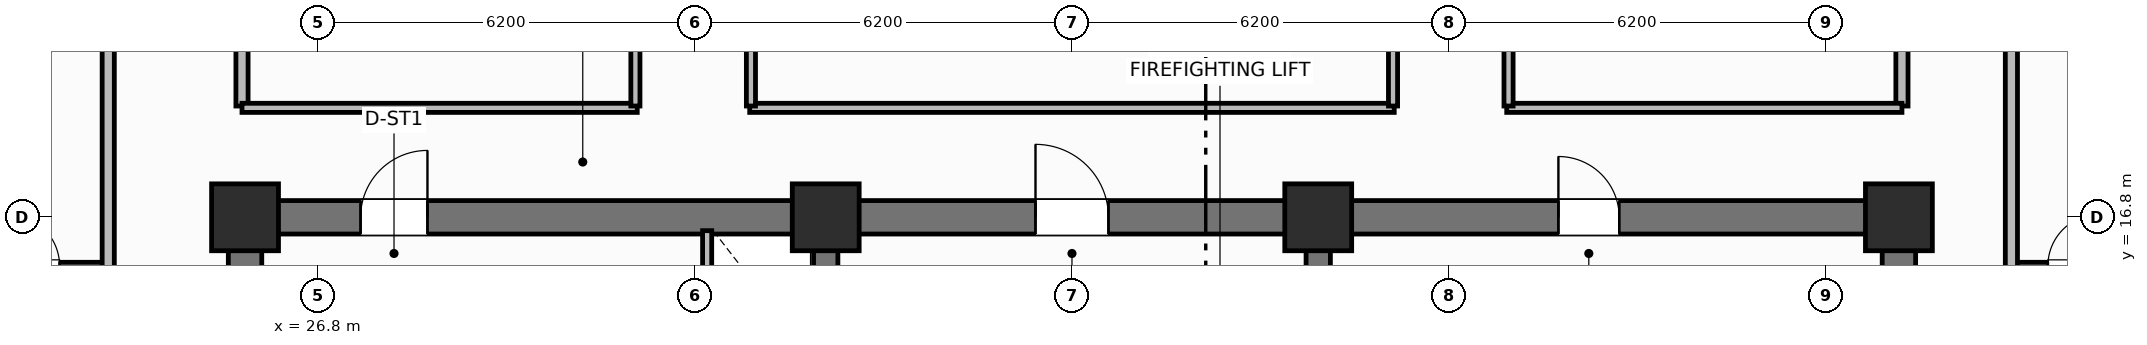
"""IFC4 building model, lengths in metres.
Left out: names, types, materials, properties, quantities, classifications, styles, units other than length and angle.
Written with IfcOpenShell. Run it as: python <this file> out.ifc"""

import sys

from ifc_helpers import new_model, si_unit, direction, frame, frame_2d, origin, origin_2d, place, context, subcontext, project, spatial, rectangle, extrude, element, fill, save


model = new_model("IFC4")
c1 = context("Model", 3, precision=1e-05, world=origin(), true_north=direction((0.0, 1.0)))
c2 = subcontext(c1, "Body", "Model", "MODEL_VIEW")
j1 = project(units=[si_unit("LENGTHUNIT", "METRE"), si_unit("PLANEANGLEUNIT", "RADIAN")], contexts=[c1])
p1 = place(None, origin())
s1 = spatial("IfcSite", under=j1, at=p1, CompositionType="ELEMENT")
p2 = place(p1, origin())
s2 = spatial("IfcBuilding", under=s1, at=p2, CompositionType="ELEMENT")
p3 = place(p2, frame((0.0, 0.0, 125.3)))
s3 = spatial("IfcBuildingStorey", under=s2, at=p3, CompositionType="ELEMENT", Elevation=125.3)
for number, where, z_axis, x_axis in (
    (1, (25.6, 10.875, 0.0), (0.0, 0.0, 1.0), (0.0, 1.0, 0.0)),
    (2, (52.8, 10.875, 0.0), (0.0, 0.0, 1.0), (0.0, 1.0, 0.0)),
):
    element("IfcWall", number, at=place(p3, frame(where, z_axis=z_axis, x_axis=x_axis)), inside=s3, PredefinedType="SHEAR", context=c2, shape_type="SweptSolid", body=[
        extrude(rectangle(XDim=5.65, YDim=0.55, at=frame_2d((2.825, 0.0))), origin(), (0.0, 0.0, 1.0), 3.7),
    ])
p4 = place(p3, frame((25.6, 16.8, 0.0), z_axis=(0.0, 0.0, 1.0), x_axis=(1.0, 0.0, 0.0)))
e3 = element("IfcWall", 3, at=p4, inside=s3, PredefinedType="SHEAR", context=c2, shape_type="SweptSolid", body=[
    extrude(rectangle(XDim=27.2, YDim=0.55, at=frame_2d((13.6, 0.0))), origin(), (0.0, 0.0, 1.0), 3.7),
])
p5 = place(p4, frame((1.9, 0.0, 0.0)))
e4 = element("IfcOpeningElement", 4, at=p5, cuts=e3, PredefinedType="OPENING", context=c2, shape_type="SweptSolid", body=[
    extrude(rectangle(XDim=1.1, YDim=2.15, at=frame_2d((0.55, 1.075))), frame((0.0, 0.285, 0.0), z_axis=(0.0, -1.0, 0.0), x_axis=(1.0, 0.0, 0.0)), (0.0, 0.0, 1.0), 0.57),
])
p6 = place(p4, frame((13.0, 0.0, 0.0)))
e5 = element("IfcOpeningElement", 5, at=p6, cuts=e3, PredefinedType="OPENING", context=c2, shape_type="SweptSolid", body=[
    extrude(rectangle(XDim=1.2, YDim=2.15, at=frame_2d((0.6, 1.075))), frame((0.0, 0.285, 0.0), z_axis=(0.0, -1.0, 0.0), x_axis=(1.0, 0.0, 0.0)), (0.0, 0.0, 1.0), 0.57),
])
p7 = place(p4, frame((21.6, 0.0, 0.0)))
e6 = element("IfcOpeningElement", 6, at=p7, cuts=e3, PredefinedType="OPENING", context=c2, shape_type="SweptSolid", body=[
    extrude(rectangle(XDim=1.0, YDim=2.15, at=frame_2d((0.5, 1.075))), frame((0.0, 0.285, 0.0), z_axis=(0.0, -1.0, 0.0), x_axis=(1.0, 0.0, 0.0)), (0.0, 0.0, 1.0), 0.57),
])
for number, where, z_axis, x_axis in (
    (7, (35.15, 10.875, 0.0), (0.0, 0.0, 1.0), (0.0, 1.0, 0.0)),
    (8, (43.25, 10.875, 0.0), (0.0, 0.0, 1.0), (0.0, 1.0, 0.0)),
):
    element("IfcWall", number, at=place(p3, frame(where, z_axis=z_axis, x_axis=x_axis)), inside=s3, PredefinedType="SHEAR", context=c2, shape_type="SweptSolid", body=[
        extrude(rectangle(XDim=5.65, YDim=0.4, at=frame_2d((2.825, 0.0))), origin(), (0.0, 0.0, 1.0), 3.7),
    ])
for number, where, z_axis, x_axis in (
    (9, (25.6, 16.8, 0.0), (0.0, 0.0, 1.0), (1.0, 0.0, 0.0)),
    (10, (35.15, 16.8, 0.0), (0.0, 0.0, 1.0), (1.0, 0.0, 0.0)),
    (11, (43.25, 16.8, 0.0), (0.0, 0.0, 1.0), (1.0, 0.0, 0.0)),
    (12, (52.8, 16.8, 0.0), (0.0, 0.0, 1.0), (1.0, 0.0, 0.0)),
):
    element("IfcColumn", number, at=place(p3, frame(where, z_axis=z_axis, x_axis=x_axis)), inside=s3, PredefinedType="COLUMN", context=c2, shape_type="SweptSolid", body=[
        extrude(rectangle(XDim=1.1, YDim=1.1, at=origin_2d()), origin(), (0.0, 0.0, 1.0), 3.7),
    ])
p8 = place(p3, frame((33.2, 14.5, 0.0), z_axis=(0.0, 0.0, 1.0), x_axis=(0.0, 1.0, 0.0)))
e13 = element("IfcWall", 13, at=p8, inside=s3, PredefinedType="PARTITIONING", context=c2, shape_type="SweptSolid", body=[
    extrude(rectangle(XDim=2.08, YDim=0.15, at=frame_2d((1.04, 0.0))), origin(), (0.0, 0.0, 1.0), 2.53),
])
p9 = place(p8, frame((0.55, 0.0, 0.0)))
e14 = element("IfcOpeningElement", 14, at=p9, cuts=e13, PredefinedType="OPENING", context=c2, shape_type="SweptSolid", body=[
    extrude(rectangle(XDim=0.85, YDim=2.05, at=frame_2d((0.425, 1.025))), frame((0.0, 0.085, 0.0), z_axis=(0.0, -1.0, 0.0), x_axis=(1.0, 0.0, 0.0)), (0.0, 0.0, 1.0), 0.17),
])
for number, where, z_axis, x_axis in (
    (15, (25.55, 18.63, 0.0), (0.0, 0.0, 1.0), (0.0, 1.0, 0.0)),
    (16, (52.85, 18.63, 0.0), (0.0, 0.0, 1.0), (0.0, 1.0, 0.0)),
):
    element("IfcWall", number, at=place(p3, frame(where, z_axis=z_axis, x_axis=x_axis)), inside=s3, PredefinedType="PARTITIONING", context=c2, shape_type="SweptSolid", body=[
        extrude(rectangle(XDim=19.14, YDim=0.2, at=frame_2d((9.57, 0.0))), origin(), (0.0, 0.0, 1.0), 2.53),
    ])
p10 = place(p3, frame((25.55, 18.6, 0.0), z_axis=(0.0, 0.0, 1.0), x_axis=(1.0, 0.0, 0.0)))
e17 = element("IfcWall", 17, at=p10, inside=s3, PredefinedType="PARTITIONING", context=c2, shape_type="SweptSolid", body=[
    extrude(rectangle(XDim=6.5, YDim=0.15, at=frame_2d((3.25, 0.0))), origin(), (0.0, 0.0, 1.0), 2.53),
])
p11 = place(p3, frame((33.9, 18.6, 0.0), z_axis=(0.0, 0.0, 1.0), x_axis=(1.0, 0.0, 0.0)))
e18 = element("IfcWall", 18, at=p11, inside=s3, PredefinedType="PARTITIONING", context=c2, shape_type="SweptSolid", body=[
    extrude(rectangle(XDim=10.6, YDim=0.15, at=frame_2d((5.3, 0.0))), origin(), (0.0, 0.0, 1.0), 2.53),
])
p12 = place(p3, frame((46.35, 18.6, 0.0), z_axis=(0.0, 0.0, 1.0), x_axis=(1.0, 0.0, 0.0)))
e19 = element("IfcWall", 19, at=p12, inside=s3, PredefinedType="PARTITIONING", context=c2, shape_type="SweptSolid", body=[
    extrude(rectangle(XDim=6.5, YDim=0.15, at=frame_2d((3.25, 0.0))), origin(), (0.0, 0.0, 1.0), 2.53),
])
p13 = place(p3, frame((32.02, 18.63, 0.0), z_axis=(0.0, 0.0, 1.0), x_axis=(0.0, 1.0, 0.0)))
e20 = element("IfcWall", 20, at=p13, inside=s3, PredefinedType="PARTITIONING", context=c2, shape_type="SweptSolid", body=[
    extrude(rectangle(XDim=19.14, YDim=0.15, at=frame_2d((9.57, 0.0))), origin(), (0.0, 0.0, 1.0), 2.53),
])
p14 = place(p13, frame((5.0, 0.0, 0.0)))
e21 = element("IfcOpeningElement", 21, at=p14, cuts=e20, PredefinedType="OPENING", context=c2, shape_type="SweptSolid", body=[
    extrude(rectangle(XDim=0.9, YDim=2.1, at=frame_2d((0.45, 1.05))), frame((0.0, 0.085, 0.0), z_axis=(0.0, -1.0, 0.0), x_axis=(1.0, 0.0, 0.0)), (0.0, 0.0, 1.0), 0.17),
])
p15 = place(p3, frame((33.92, 18.63, 0.0), z_axis=(0.0, 0.0, 1.0), x_axis=(0.0, 1.0, 0.0)))
e22 = element("IfcWall", 22, at=p15, inside=s3, PredefinedType="PARTITIONING", context=c2, shape_type="SweptSolid", body=[
    extrude(rectangle(XDim=19.14, YDim=0.15, at=frame_2d((9.57, 0.0))), origin(), (0.0, 0.0, 1.0), 2.53),
])
p16 = place(p15, frame((6.5, 0.0, 0.0)))
e23 = element("IfcOpeningElement", 23, at=p16, cuts=e22, PredefinedType="OPENING", context=c2, shape_type="SweptSolid", body=[
    extrude(rectangle(XDim=1.0, YDim=2.15, at=frame_2d((0.5, 1.075))), frame((0.0, 0.085, 0.0), z_axis=(0.0, -1.0, 0.0), x_axis=(1.0, 0.0, 0.0)), (0.0, 0.0, 1.0), 0.17),
])
p17 = place(p3, frame((44.48, 18.63, 0.0), z_axis=(0.0, 0.0, 1.0), x_axis=(0.0, 1.0, 0.0)))
e24 = element("IfcWall", 24, at=p17, inside=s3, PredefinedType="PARTITIONING", context=c2, shape_type="SweptSolid", body=[
    extrude(rectangle(XDim=19.14, YDim=0.15, at=frame_2d((9.57, 0.0))), origin(), (0.0, 0.0, 1.0), 2.53),
])
p18 = place(p3, frame((46.38, 18.63, 0.0), z_axis=(0.0, 0.0, 1.0), x_axis=(0.0, 1.0, 0.0)))
e25 = element("IfcWall", 25, at=p18, inside=s3, PredefinedType="PARTITIONING", context=c2, shape_type="SweptSolid", body=[
    extrude(rectangle(XDim=19.14, YDim=0.15, at=frame_2d((9.57, 0.0))), origin(), (0.0, 0.0, 1.0), 2.53),
])
p19 = place(p18, frame((3.0, 0.0, 0.0)))
e26 = element("IfcOpeningElement", 26, at=p19, cuts=e25, PredefinedType="OPENING", context=c2, shape_type="SweptSolid", body=[
    extrude(rectangle(XDim=0.9, YDim=2.1, at=frame_2d((0.45, 1.05))), frame((0.0, 0.085, 0.0), z_axis=(0.0, -1.0, 0.0), x_axis=(1.0, 0.0, 0.0)), (0.0, 0.0, 1.0), 0.17),
])
p20 = place(p18, frame((11.5, 0.0, 0.0)))
e27 = element("IfcOpeningElement", 27, at=p20, cuts=e25, PredefinedType="OPENING", context=c2, shape_type="SweptSolid", body=[
    extrude(rectangle(XDim=0.9, YDim=2.1, at=frame_2d((0.45, 1.05))), frame((0.0, 0.085, 0.0), z_axis=(0.0, -1.0, 0.0), x_axis=(1.0, 0.0, 0.0)), (0.0, 0.0, 1.0), 0.17),
])
p21 = place(p3, frame((21.1, 16.0, 0.0), z_axis=(0.0, 0.0, 1.0), x_axis=(1.0, 0.0, 0.0)))
e28 = element("IfcWall", 28, at=p21, inside=s3, PredefinedType="PARTITIONING", context=c2, shape_type="SweptSolid", body=[
    extrude(rectangle(XDim=2.25, YDim=0.12, at=frame_2d((1.125, 0.0))), origin(), (0.0, 0.0, 1.0), 2.53),
])
p22 = place(p21, frame((0.6, 0.0, 0.0)))
e29 = element("IfcOpeningElement", 29, at=p22, cuts=e28, PredefinedType="OPENING", context=c2, shape_type="SweptSolid", body=[
    extrude(rectangle(XDim=0.85, YDim=2.1, at=frame_2d((0.425, 1.05))), frame((0.0, 0.07, 0.0), z_axis=(0.0, -1.0, 0.0), x_axis=(1.0, 0.0, 0.0)), (0.0, 0.0, 1.0), 0.14),
])
p23 = place(p3, frame((23.35, 10.6, 0.0), z_axis=(0.0, 0.0, 1.0), x_axis=(0.0, 1.0, 0.0)))
e30 = element("IfcWall", 30, at=p23, inside=s3, PredefinedType="PARTITIONING", context=c2, shape_type="SweptSolid", body=[
    extrude(rectangle(XDim=35.2, YDim=0.2, at=frame_2d((17.6, 0.0))), origin(), (0.0, 0.0, 1.0), 2.53),
])
p24 = place(p23, frame((2.65, 0.0, 0.0)))
e31 = element("IfcOpeningElement", 31, at=p24, cuts=e30, PredefinedType="OPENING", context=c2, shape_type="SweptSolid", body=[
    extrude(rectangle(XDim=1.0, YDim=2.15, at=frame_2d((0.5, 1.075))), frame((0.0, 0.11, 0.0), z_axis=(0.0, -1.0, 0.0), x_axis=(1.0, 0.0, 0.0)), (0.0, 0.0, 1.0), 0.22),
])
p25 = place(p23, frame((19.95, 0.0, 0.0)))
e32 = element("IfcOpeningElement", 32, at=p25, cuts=e30, PredefinedType="OPENING", context=c2, shape_type="SweptSolid", body=[
    extrude(rectangle(XDim=1.0, YDim=2.15, at=frame_2d((0.5, 1.075))), frame((0.0, 0.11, 0.0), z_axis=(0.0, -1.0, 0.0), x_axis=(1.0, 0.0, 0.0)), (0.0, 0.0, 1.0), 0.22),
])
p26 = place(p3, frame((54.65, 16.0, 0.0), z_axis=(0.0, 0.0, 1.0), x_axis=(1.0, 0.0, 0.0)))
e33 = element("IfcWall", 33, at=p26, inside=s3, PredefinedType="PARTITIONING", context=c2, shape_type="SweptSolid", body=[
    extrude(rectangle(XDim=2.25, YDim=0.12, at=frame_2d((1.125, 0.0))), origin(), (0.0, 0.0, 1.0), 2.53),
])
p27 = place(p26, frame((0.6, 0.0, 0.0)))
e34 = element("IfcOpeningElement", 34, at=p27, cuts=e33, PredefinedType="OPENING", context=c2, shape_type="SweptSolid", body=[
    extrude(rectangle(XDim=0.85, YDim=2.1, at=frame_2d((0.425, 1.05))), frame((0.0, 0.07, 0.0), z_axis=(0.0, -1.0, 0.0), x_axis=(1.0, 0.0, 0.0)), (0.0, 0.0, 1.0), 0.14),
])
p28 = place(p3, frame((54.65, 10.6, 0.0), z_axis=(0.0, 0.0, 1.0), x_axis=(0.0, 1.0, 0.0)))
e35 = element("IfcWall", 35, at=p28, inside=s3, PredefinedType="PARTITIONING", context=c2, shape_type="SweptSolid", body=[
    extrude(rectangle(XDim=35.2, YDim=0.2, at=frame_2d((17.6, 0.0))), origin(), (0.0, 0.0, 1.0), 2.53),
])
p29 = place(p28, frame((2.65, 0.0, 0.0)))
e36 = element("IfcOpeningElement", 36, at=p29, cuts=e35, PredefinedType="OPENING", context=c2, shape_type="SweptSolid", body=[
    extrude(rectangle(XDim=1.0, YDim=2.15, at=frame_2d((0.5, 1.075))), frame((0.0, 0.11, 0.0), z_axis=(0.0, -1.0, 0.0), x_axis=(1.0, 0.0, 0.0)), (0.0, 0.0, 1.0), 0.22),
])
p30 = place(p28, frame((12.518, 0.0, 0.0)))
e37 = element("IfcOpeningElement", 37, at=p30, cuts=e35, PredefinedType="OPENING", context=c2, shape_type="SweptSolid", body=[
    extrude(rectangle(XDim=1.0, YDim=2.15, at=frame_2d((0.5, 1.075))), frame((0.0, 0.11, 0.0), z_axis=(0.0, -1.0, 0.0), x_axis=(1.0, 0.0, 0.0)), (0.0, 0.0, 1.0), 0.22),
])
p31 = place(p28, frame((23.65, 0.0, 0.0)))
e38 = element("IfcOpeningElement", 38, at=p31, cuts=e35, PredefinedType="OPENING", context=c2, shape_type="SweptSolid", body=[
    extrude(rectangle(XDim=1.0, YDim=2.15, at=frame_2d((0.5, 1.075))), frame((0.0, 0.11, 0.0), z_axis=(0.0, -1.0, 0.0), x_axis=(1.0, 0.0, 0.0)), (0.0, 0.0, 1.0), 0.22),
])
p32 = place(p22, origin())
e39 = element("IfcDoor", 39, at=p32, inside=s3, OperationType="SINGLE_SWING_LEFT", PredefinedType="DOOR", context=c2, shape_type="SweptSolid", body=[
    extrude(rectangle(XDim=0.85, YDim=2.1, at=frame_2d((0.425, 1.05))), frame((0.0, 0.025, 0.0), z_axis=(0.0, -1.0, 0.0), x_axis=(1.0, 0.0, 0.0)), (0.0, 0.0, 1.0), 0.05),
])
fill(e29, e39)
p33 = place(p27, origin())
e40 = element("IfcDoor", 40, at=p33, inside=s3, OperationType="SINGLE_SWING_RIGHT", PredefinedType="DOOR", context=c2, shape_type="SweptSolid", body=[
    extrude(rectangle(XDim=0.85, YDim=2.1, at=frame_2d((0.425, 1.05))), frame((0.0, 0.025, 0.0), z_axis=(0.0, -1.0, 0.0), x_axis=(1.0, 0.0, 0.0)), (0.0, 0.0, 1.0), 0.05),
])
fill(e34, e40)
p34 = place(p5, origin())
e41 = element("IfcDoor", 41, at=p34, inside=s3, OperationType="SINGLE_SWING_RIGHT", PredefinedType="DOOR", context=c2, shape_type="SweptSolid", body=[
    extrude(rectangle(XDim=1.1, YDim=2.15, at=frame_2d((0.55, 1.075))), frame((0.0, 0.025, 0.0), z_axis=(0.0, -1.0, 0.0), x_axis=(1.0, 0.0, 0.0)), (0.0, 0.0, 1.0), 0.05),
])
fill(e4, e41)
p35 = place(p6, origin())
e42 = element("IfcDoor", 42, at=p35, inside=s3, OperationType="SINGLE_SWING_LEFT", PredefinedType="DOOR", context=c2, shape_type="SweptSolid", body=[
    extrude(rectangle(XDim=1.2, YDim=2.15, at=frame_2d((0.6, 1.075))), frame((0.0, 0.025, 0.0), z_axis=(0.0, -1.0, 0.0), x_axis=(1.0, 0.0, 0.0)), (0.0, 0.0, 1.0), 0.05),
])
fill(e5, e42)
p36 = place(p7, origin())
e43 = element("IfcDoor", 43, at=p36, inside=s3, OperationType="SINGLE_SWING_LEFT", PredefinedType="DOOR", context=c2, shape_type="SweptSolid", body=[
    extrude(rectangle(XDim=1.0, YDim=2.15, at=frame_2d((0.5, 1.075))), frame((0.0, 0.025, 0.0), z_axis=(0.0, -1.0, 0.0), x_axis=(1.0, 0.0, 0.0)), (0.0, 0.0, 1.0), 0.05),
])
fill(e6, e43)
save(model, sys.argv[1])
